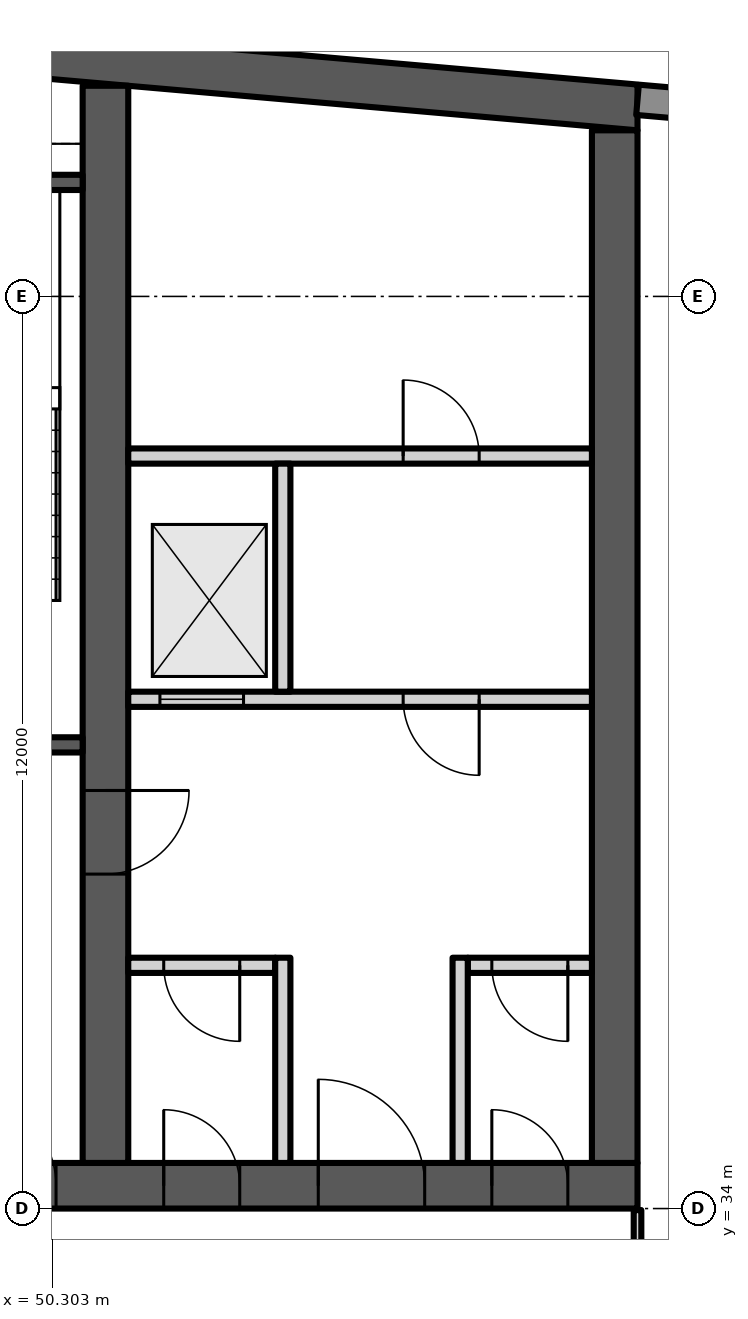
"""IFC4 building model, lengths in metres.
Left out: names, types, materials, properties, quantities, classifications, styles, units other than length and angle.
Written with IfcOpenShell. Run it as: python <this file> out.ifc"""

import sys

from ifc_helpers import new_model, si_unit, direction, frame, frame_2d, origin, place, context, subcontext, project, spatial, polyline, rectangle, outline, extrude, element, fill, save


model = new_model("IFC4")
c1 = context("Model", 3, precision=1e-05, world=origin(), true_north=direction((0.0, 1.0)))
c2 = subcontext(c1, "Body", "Model", "MODEL_VIEW")
j1 = project(units=[si_unit("LENGTHUNIT", "METRE"), si_unit("PLANEANGLEUNIT", "RADIAN")], contexts=[c1])
p1 = place(None, origin())
s1 = spatial("IfcSite", under=j1, at=p1, CompositionType="ELEMENT")
p2 = place(p1, origin())
s2 = spatial("IfcBuilding", under=s1, at=p2, CompositionType="ELEMENT")
p3 = place(p2, frame((0.0, 0.0, 232.3)))
s3 = spatial("IfcBuildingStorey", under=s2, at=p3, CompositionType="ELEMENT", Elevation=232.3)
p4 = place(p3, frame((0.0, 0.0, -0.0)))
e1 = element("IfcWall", 1, at=p4, inside=s3, PredefinedType="SHEAR", context=c2, shape_type="SweptSolid", body=[
    extrude(outline(polyline([(23.0, 48.185), (40.5, 49.716), (58.0, 48.185), (58.0, 48.787), (40.5, 50.318), (23.0, 48.787), (23.0, 48.185)])), origin(), (0.0, 0.0, 1.0), 3.6),
])
p5 = place(p3, frame((23.0, 34.3, 0.0), z_axis=(0.0, 0.0, 1.0), x_axis=(1.0, 0.0, 0.0)))
e2 = element("IfcWall", 2, at=p5, inside=s3, PredefinedType="SHEAR", context=c2, shape_type="SweptSolid", body=[
    extrude(rectangle(XDim=35.0, YDim=0.6, at=frame_2d((17.5, 0.0))), origin(), (0.0, 0.0, 1.0), 3.6),
])
p6 = place(p5, frame((0.65, 0.0, 0.0)))
e3 = element("IfcOpeningElement", 3, at=p6, cuts=e2, PredefinedType="OPENING", context=c2, shape_type="SweptSolid", body=[
    extrude(rectangle(XDim=1.2, YDim=2.1, at=frame_2d((0.6, 1.05))), frame((0.0, 0.31, 0.0), z_axis=(0.0, -1.0, 0.0), x_axis=(1.0, 0.0, 0.0)), (0.0, 0.0, 1.0), 0.62),
])
p7 = place(p5, frame((7.717, 0.0, 0.0)))
e4 = element("IfcOpeningElement", 4, at=p7, cuts=e2, PredefinedType="OPENING", context=c2, shape_type="SweptSolid", body=[
    extrude(rectangle(XDim=1.1, YDim=2.1, at=frame_2d((0.55, 1.05))), frame((0.0, 0.31, 0.0), z_axis=(0.0, -1.0, 0.0), x_axis=(1.0, 0.0, 0.0)), (0.0, 0.0, 1.0), 0.62),
])
p8 = place(p5, frame((12.183, 0.0, 0.0)))
e5 = element("IfcOpeningElement", 5, at=p8, cuts=e2, PredefinedType="OPENING", context=c2, shape_type="SweptSolid", body=[
    extrude(rectangle(XDim=1.1, YDim=2.1, at=frame_2d((0.55, 1.05))), frame((0.0, 0.31, 0.0), z_axis=(0.0, -1.0, 0.0), x_axis=(1.0, 0.0, 0.0)), (0.0, 0.0, 1.0), 0.62),
])
p9 = place(p5, frame((9.8, 0.0, 0.0)))
e6 = element("IfcOpeningElement", 6, at=p9, cuts=e2, PredefinedType="OPENING", context=c2, shape_type="SweptSolid", body=[
    extrude(rectangle(XDim=1.4, YDim=2.1, at=frame_2d((0.7, 1.05))), frame((0.0, 0.31, 0.0), z_axis=(0.0, -1.0, 0.0), x_axis=(1.0, 0.0, 0.0)), (0.0, 0.0, 1.0), 0.62),
])
p10 = place(p5, frame((14.717, 0.0, 0.0)))
e7 = element("IfcOpeningElement", 7, at=p10, cuts=e2, PredefinedType="OPENING", context=c2, shape_type="SweptSolid", body=[
    extrude(rectangle(XDim=1.1, YDim=2.1, at=frame_2d((0.55, 1.05))), frame((0.0, 0.31, 0.0), z_axis=(0.0, -1.0, 0.0), x_axis=(1.0, 0.0, 0.0)), (0.0, 0.0, 1.0), 0.62),
])
p11 = place(p5, frame((16.95, 0.0, 0.0)))
e8 = element("IfcOpeningElement", 8, at=p11, cuts=e2, PredefinedType="OPENING", context=c2, shape_type="SweptSolid", body=[
    extrude(rectangle(XDim=1.1, YDim=2.1, at=frame_2d((0.55, 1.05))), frame((0.0, 0.31, 0.0), z_axis=(0.0, -1.0, 0.0), x_axis=(1.0, 0.0, 0.0)), (0.0, 0.0, 1.0), 0.62),
])
p12 = place(p5, frame((19.183, 0.0, 0.0)))
e9 = element("IfcOpeningElement", 9, at=p12, cuts=e2, PredefinedType="OPENING", context=c2, shape_type="SweptSolid", body=[
    extrude(rectangle(XDim=1.1, YDim=2.1, at=frame_2d((0.55, 1.05))), frame((0.0, 0.31, 0.0), z_axis=(0.0, -1.0, 0.0), x_axis=(1.0, 0.0, 0.0)), (0.0, 0.0, 1.0), 0.62),
])
p13 = place(p5, frame((26.15, 0.0, 0.0)))
e10 = element("IfcOpeningElement", 10, at=p13, cuts=e2, PredefinedType="OPENING", context=c2, shape_type="SweptSolid", body=[
    extrude(rectangle(XDim=1.2, YDim=2.1, at=frame_2d((0.6, 1.05))), frame((0.0, 0.31, 0.0), z_axis=(0.0, -1.0, 0.0), x_axis=(1.0, 0.0, 0.0)), (0.0, 0.0, 1.0), 0.62),
])
p14 = place(p5, frame((28.767, 0.0, 0.0)))
e11 = element("IfcOpeningElement", 11, at=p14, cuts=e2, PredefinedType="OPENING", context=c2, shape_type="SweptSolid", body=[
    extrude(rectangle(XDim=1.0, YDim=2.1, at=frame_2d((0.5, 1.05))), frame((0.0, 0.31, 0.0), z_axis=(0.0, -1.0, 0.0), x_axis=(1.0, 0.0, 0.0)), (0.0, 0.0, 1.0), 0.62),
])
p15 = place(p5, frame((33.083, 0.0, 0.0)))
e12 = element("IfcOpeningElement", 12, at=p15, cuts=e2, PredefinedType="OPENING", context=c2, shape_type="SweptSolid", body=[
    extrude(rectangle(XDim=1.0, YDim=2.1, at=frame_2d((0.5, 1.05))), frame((0.0, 0.31, 0.0), z_axis=(0.0, -1.0, 0.0), x_axis=(1.0, 0.0, 0.0)), (0.0, 0.0, 1.0), 0.62),
])
p16 = place(p5, frame((30.8, 0.0, 0.0)))
e13 = element("IfcOpeningElement", 13, at=p16, cuts=e2, PredefinedType="OPENING", context=c2, shape_type="SweptSolid", body=[
    extrude(rectangle(XDim=1.4, YDim=2.1, at=frame_2d((0.7, 1.05))), frame((0.0, 0.31, 0.0), z_axis=(0.0, -1.0, 0.0), x_axis=(1.0, 0.0, 0.0)), (0.0, 0.0, 1.0), 0.62),
])
p17 = place(p3, frame((51.0, 34.6, 0.0), z_axis=(0.0, 0.0, 1.0), x_axis=(0.0, 1.0, 0.0)))
e14 = element("IfcWall", 14, at=p17, inside=s3, PredefinedType="SHEAR", context=c2, shape_type="SweptSolid", body=[
    extrude(rectangle(XDim=14.171, YDim=0.6, at=frame_2d((7.085, 0.0))), origin(), (0.0, 0.0, 1.0), 3.6),
])
p18 = place(p17, frame((3.8, 0.0, 0.0)))
e15 = element("IfcOpeningElement", 15, at=p18, cuts=e14, PredefinedType="OPENING", context=c2, shape_type="SweptSolid", body=[
    extrude(rectangle(XDim=1.1, YDim=2.1, at=frame_2d((0.55, 1.05))), frame((0.0, 0.31, 0.0), z_axis=(0.0, -1.0, 0.0), x_axis=(1.0, 0.0, 0.0)), (0.0, 0.0, 1.0), 0.62),
])
p19 = place(p3, frame((57.7, 34.6, 0.0), z_axis=(0.0, 0.0, 1.0), x_axis=(0.0, 1.0, 0.0)))
e16 = element("IfcWall", 16, at=p19, inside=s3, PredefinedType="SHEAR", context=c2, shape_type="SweptSolid", body=[
    extrude(rectangle(XDim=13.585, YDim=0.6, at=frame_2d((6.792, 0.0))), origin(), (0.0, 0.0, 1.0), 3.6),
])
p20 = place(p3, frame((60.983, 48.326, 0.0), z_axis=(0.0, 0.0, 1.0), x_axis=(-0.996194, 0.087168, 0.0)))
e17 = element("IfcWall", 17, at=p20, inside=s3, PredefinedType="SOLIDWALL", context=c2, shape_type="SweptSolid", body=[
    extrude(rectangle(XDim=2.994, YDim=0.4, at=frame_2d((1.497, 0.0))), origin(), (0.0, 0.0, 1.0), 3.2),
])
p21 = place(p3, frame((44.3, 40.1, 0.0), z_axis=(0.0, 0.0, 1.0), x_axis=(1.0, 0.0, 0.0)))
e18 = element("IfcWall", 18, at=p21, inside=s3, PredefinedType="SHEAR", context=c2, shape_type="SweptSolid", body=[
    extrude(rectangle(XDim=6.4, YDim=0.2, at=frame_2d((3.2, 0.0))), origin(), (0.0, 0.0, 1.0), 3.2),
])
p22 = place(p21, frame((3.625, 0.0, 0.0)))
e19 = element("IfcOpeningElement", 19, at=p22, cuts=e18, PredefinedType="OPENING", context=c2, shape_type="SweptSolid", body=[
    extrude(rectangle(XDim=1.2, YDim=2.1, at=frame_2d((0.6, 1.05))), frame((0.0, 0.11, 0.0), z_axis=(0.0, -1.0, 0.0), x_axis=(1.0, 0.0, 0.0)), (0.0, 0.0, 1.0), 0.22),
])
p23 = place(p21, frame((0.625, 0.0, 0.0)))
e20 = element("IfcOpeningElement", 20, at=p23, cuts=e18, PredefinedType="OPENING", context=c2, shape_type="SweptSolid", body=[
    extrude(rectangle(XDim=0.9, YDim=2.1, at=frame_2d((0.45, 1.05))), frame((0.0, 0.11, 0.0), z_axis=(0.0, -1.0, 0.0), x_axis=(1.0, 0.0, 0.0)), (0.0, 0.0, 1.0), 0.22),
])
p24 = place(p3, frame((46.75, 47.5, 0.0), z_axis=(0.0, 0.0, 1.0), x_axis=(1.0, 0.0, 0.0)))
e21 = element("IfcWall", 21, at=p24, inside=s3, PredefinedType="SHEAR", context=c2, shape_type="SweptSolid", body=[
    extrude(rectangle(XDim=3.95, YDim=0.2, at=frame_2d((1.975, 0.0))), origin(), (0.0, 0.0, 1.0), 3.2),
])
p25 = place(p3, frame((51.3, 37.2, 0.0), z_axis=(0.0, 0.0, 1.0), x_axis=(1.0, 0.0, 0.0)))
e22 = element("IfcWall", 22, at=p25, inside=s3, PredefinedType="PARTITIONING", context=c2, shape_type="SweptSolid", body=[
    extrude(rectangle(XDim=1.933, YDim=0.2, at=frame_2d((0.967, 0.0))), origin(), (0.0, 0.0, 1.0), 3.2),
])
p26 = place(p25, frame((0.467, 0.0, 0.0)))
e23 = element("IfcOpeningElement", 23, at=p26, cuts=e22, PredefinedType="OPENING", context=c2, shape_type="SweptSolid", body=[
    extrude(rectangle(XDim=1.0, YDim=2.1, at=frame_2d((0.5, 1.05))), frame((0.0, 0.11, 0.0), z_axis=(0.0, -1.0, 0.0), x_axis=(1.0, 0.0, 0.0)), (0.0, 0.0, 1.0), 0.22),
])
p27 = place(p3, frame((55.767, 37.2, 0.0), z_axis=(0.0, 0.0, 1.0), x_axis=(1.0, 0.0, 0.0)))
e24 = element("IfcWall", 24, at=p27, inside=s3, PredefinedType="PARTITIONING", context=c2, shape_type="SweptSolid", body=[
    extrude(rectangle(XDim=1.633, YDim=0.2, at=frame_2d((0.817, 0.0))), origin(), (0.0, 0.0, 1.0), 3.2),
])
p28 = place(p27, frame((0.317, 0.0, 0.0)))
e25 = element("IfcOpeningElement", 25, at=p28, cuts=e24, PredefinedType="OPENING", context=c2, shape_type="SweptSolid", body=[
    extrude(rectangle(XDim=1.0, YDim=2.1, at=frame_2d((0.5, 1.05))), frame((0.0, 0.11, 0.0), z_axis=(0.0, -1.0, 0.0), x_axis=(1.0, 0.0, 0.0)), (0.0, 0.0, 1.0), 0.22),
])
p29 = place(p3, frame((51.3, 40.7, 0.0), z_axis=(0.0, 0.0, 1.0), x_axis=(1.0, 0.0, 0.0)))
e26 = element("IfcWall", 26, at=p29, inside=s3, PredefinedType="PARTITIONING", context=c2, shape_type="SweptSolid", body=[
    extrude(rectangle(XDim=6.1, YDim=0.2, at=frame_2d((3.05, 0.0))), origin(), (0.0, 0.0, 1.0), 3.2),
])
p30 = place(p29, frame((0.417, 0.0, 0.0)))
e27 = element("IfcOpeningElement", 27, at=p30, cuts=e26, PredefinedType="OPENING", context=c2, shape_type="SweptSolid", body=[
    extrude(rectangle(XDim=1.1, YDim=2.1, at=frame_2d((0.55, 1.05))), frame((0.0, 0.11, 0.0), z_axis=(0.0, -1.0, 0.0), x_axis=(1.0, 0.0, 0.0)), (0.0, 0.0, 1.0), 0.22),
])
p31 = place(p29, frame((3.617, 0.0, 0.0)))
e28 = element("IfcOpeningElement", 28, at=p31, cuts=e26, PredefinedType="OPENING", context=c2, shape_type="SweptSolid", body=[
    extrude(rectangle(XDim=1.0, YDim=2.1, at=frame_2d((0.5, 1.05))), frame((0.0, 0.11, 0.0), z_axis=(0.0, -1.0, 0.0), x_axis=(1.0, 0.0, 0.0)), (0.0, 0.0, 1.0), 0.22),
])
p32 = place(p3, frame((51.3, 43.9, 0.0), z_axis=(0.0, 0.0, 1.0), x_axis=(1.0, 0.0, 0.0)))
e29 = element("IfcWall", 29, at=p32, inside=s3, PredefinedType="PARTITIONING", context=c2, shape_type="SweptSolid", body=[
    extrude(rectangle(XDim=6.1, YDim=0.2, at=frame_2d((3.05, 0.0))), origin(), (0.0, 0.0, 1.0), 3.2),
])
p33 = place(p32, frame((3.617, 0.0, 0.0)))
e30 = element("IfcOpeningElement", 30, at=p33, cuts=e29, PredefinedType="OPENING", context=c2, shape_type="SweptSolid", body=[
    extrude(rectangle(XDim=1.0, YDim=2.1, at=frame_2d((0.5, 1.05))), frame((0.0, 0.11, 0.0), z_axis=(0.0, -1.0, 0.0), x_axis=(1.0, 0.0, 0.0)), (0.0, 0.0, 1.0), 0.22),
])
p34 = place(p3, frame((0.0, 0.0, -0.0)))
e31 = element("IfcWall", 31, at=p34, inside=s3, PredefinedType="PARTITIONING", context=c2, shape_type="SweptSolid", body=[
    extrude(outline(polyline([(53.233, 34.6), (53.233, 37.3), (53.433, 37.3), (53.433, 34.6), (53.233, 34.6)])), origin(), (0.0, 0.0, 1.0), 3.2),
])
p35 = place(p3, frame((0.0, 0.0, -0.0)))
e32 = element("IfcWall", 32, at=p35, inside=s3, PredefinedType="PARTITIONING", context=c2, shape_type="SweptSolid", body=[
    extrude(outline(polyline([(55.567, 34.6), (55.567, 37.3), (55.767, 37.3), (55.767, 34.6), (55.567, 34.6)])), origin(), (0.0, 0.0, 1.0), 3.2),
])
p36 = place(p3, frame((0.0, 0.0, -0.0)))
e33 = element("IfcWall", 33, at=p36, inside=s3, PredefinedType="PARTITIONING", context=c2, shape_type="SweptSolid", body=[
    extrude(outline(polyline([(53.433, 40.8), (53.433, 43.8), (53.233, 43.8), (53.233, 40.8), (53.433, 40.8)])), origin(), (0.0, 0.0, 1.0), 3.2),
])
p37 = place(p3, frame((58.0, 31.925, 0.0), z_axis=(0.0, 0.0, 1.0), x_axis=(0.0, 1.0, 0.0)))
e34 = element("IfcWall", 34, at=p37, inside=s3, PredefinedType="PARTITIONING", context=c2, shape_type="SweptSolid", body=[
    extrude(rectangle(XDim=2.055, YDim=0.1, at=frame_2d((1.027, 0.0))), origin(), (0.0, 0.0, 1.0), 3.2),
])
p38 = place(p13, origin())
e35 = element("IfcDoor", 35, at=p38, inside=s3, OperationType="SINGLE_SWING_LEFT", PredefinedType="DOOR", context=c2, shape_type="SweptSolid", body=[
    extrude(rectangle(XDim=1.2, YDim=2.1, at=frame_2d((0.6, 1.05))), frame((0.0, 0.025, 0.0), z_axis=(0.0, -1.0, 0.0), x_axis=(1.0, 0.0, 0.0)), (0.0, 0.0, 1.0), 0.05),
])
fill(e10, e35)
p39 = place(p14, origin())
e36 = element("IfcDoor", 36, at=p39, inside=s3, OperationType="SINGLE_SWING_LEFT", PredefinedType="DOOR", context=c2, shape_type="SweptSolid", body=[
    extrude(rectangle(XDim=1.0, YDim=2.1, at=frame_2d((0.5, 1.05))), frame((0.0, 0.025, 0.0), z_axis=(0.0, -1.0, 0.0), x_axis=(1.0, 0.0, 0.0)), (0.0, 0.0, 1.0), 0.05),
])
fill(e11, e36)
p40 = place(p26, origin())
e37 = element("IfcDoor", 37, at=p40, inside=s3, OperationType="SINGLE_SWING_RIGHT", PredefinedType="DOOR", context=c2, shape_type="SweptSolid", body=[
    extrude(rectangle(XDim=1.0, YDim=2.1, at=frame_2d((0.5, 1.05))), frame((0.0, 0.025, 0.0), z_axis=(0.0, -1.0, 0.0), x_axis=(1.0, 0.0, 0.0)), (0.0, 0.0, 1.0), 0.05),
])
fill(e23, e37)
p41 = place(p15, origin())
e38 = element("IfcDoor", 38, at=p41, inside=s3, OperationType="SINGLE_SWING_LEFT", PredefinedType="DOOR", context=c2, shape_type="SweptSolid", body=[
    extrude(rectangle(XDim=1.0, YDim=2.1, at=frame_2d((0.5, 1.05))), frame((0.0, 0.025, 0.0), z_axis=(0.0, -1.0, 0.0), x_axis=(1.0, 0.0, 0.0)), (0.0, 0.0, 1.0), 0.05),
])
fill(e12, e38)
p42 = place(p28, origin())
e39 = element("IfcDoor", 39, at=p42, inside=s3, OperationType="SINGLE_SWING_RIGHT", PredefinedType="DOOR", context=c2, shape_type="SweptSolid", body=[
    extrude(rectangle(XDim=1.0, YDim=2.1, at=frame_2d((0.5, 1.05))), frame((0.0, 0.025, 0.0), z_axis=(0.0, -1.0, 0.0), x_axis=(1.0, 0.0, 0.0)), (0.0, 0.0, 1.0), 0.05),
])
fill(e25, e39)
p43 = place(p16, origin())
e40 = element("IfcDoor", 40, at=p43, inside=s3, OperationType="DOUBLE_DOOR_SINGLE_SWING", PredefinedType="DOOR", context=c2, shape_type="SweptSolid", body=[
    extrude(rectangle(XDim=1.4, YDim=2.1, at=frame_2d((0.7, 1.05))), frame((0.0, 0.025, 0.0), z_axis=(0.0, -1.0, 0.0), x_axis=(1.0, 0.0, 0.0)), (0.0, 0.0, 1.0), 0.05),
])
fill(e13, e40)
p44 = place(p30, origin())
e41 = element("IfcDoor", 41, at=p44, inside=s3, OperationType="DOUBLE_DOOR_SLIDING", PredefinedType="DOOR", context=c2, shape_type="SweptSolid", body=[
    extrude(rectangle(XDim=1.1, YDim=2.1, at=frame_2d((0.55, 1.05))), frame((0.0, 0.025, 0.0), z_axis=(0.0, -1.0, 0.0), x_axis=(1.0, 0.0, 0.0)), (0.0, 0.0, 1.0), 0.05),
])
fill(e27, e41)
p45 = place(p31, origin())
e42 = element("IfcDoor", 42, at=p45, inside=s3, OperationType="SINGLE_SWING_RIGHT", PredefinedType="DOOR", context=c2, shape_type="SweptSolid", body=[
    extrude(rectangle(XDim=1.0, YDim=2.1, at=frame_2d((0.5, 1.05))), frame((0.0, 0.025, 0.0), z_axis=(0.0, -1.0, 0.0), x_axis=(1.0, 0.0, 0.0)), (0.0, 0.0, 1.0), 0.05),
])
fill(e28, e42)
p46 = place(p33, origin())
e43 = element("IfcDoor", 43, at=p46, inside=s3, OperationType="SINGLE_SWING_LEFT", PredefinedType="DOOR", context=c2, shape_type="SweptSolid", body=[
    extrude(rectangle(XDim=1.0, YDim=2.1, at=frame_2d((0.5, 1.05))), frame((0.0, 0.025, 0.0), z_axis=(0.0, -1.0, 0.0), x_axis=(1.0, 0.0, 0.0)), (0.0, 0.0, 1.0), 0.05),
])
fill(e30, e43)
p47 = place(p18, origin())
e44 = element("IfcDoor", 44, at=p47, inside=s3, OperationType="SINGLE_SWING_RIGHT", PredefinedType="DOOR", context=c2, shape_type="SweptSolid", body=[
    extrude(rectangle(XDim=1.1, YDim=2.1, at=frame_2d((0.55, 1.05))), frame((0.0, 0.025, 0.0), z_axis=(0.0, -1.0, 0.0), x_axis=(1.0, 0.0, 0.0)), (0.0, 0.0, 1.0), 0.05),
])
fill(e15, e44)
save(model, sys.argv[1])
